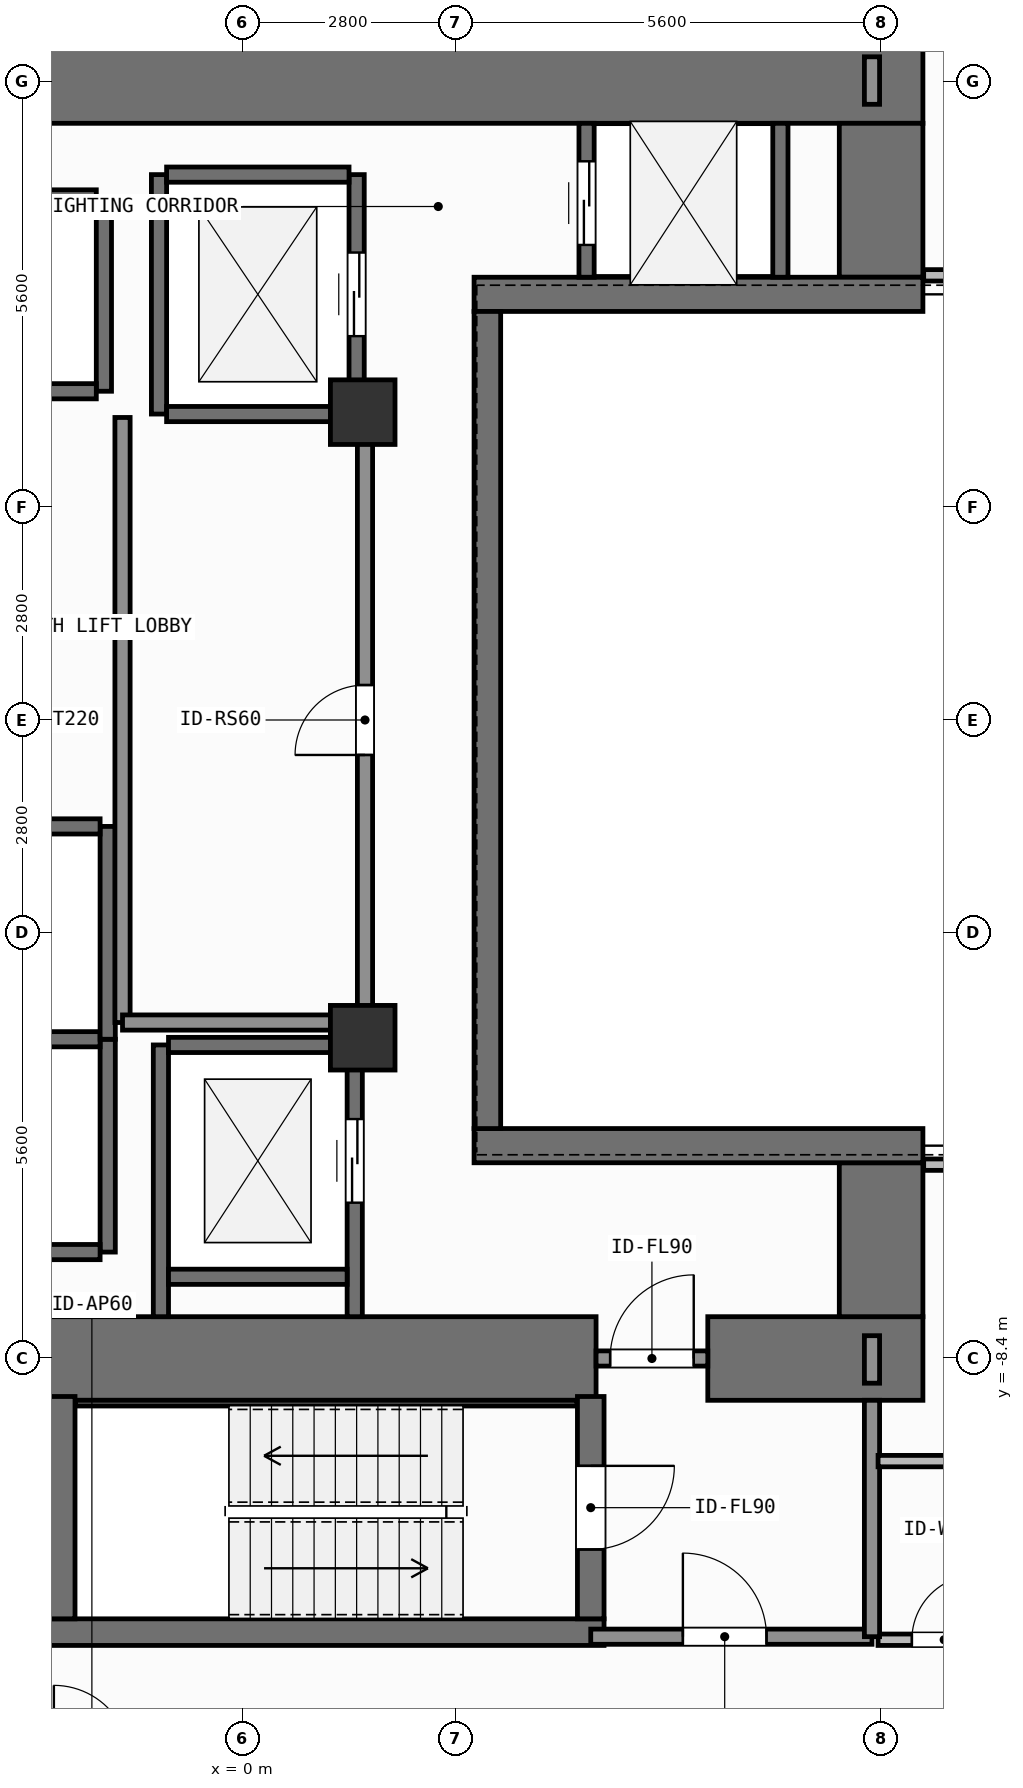
"""IFC4 building model, lengths in metres.
Left out: names, types, materials, properties, quantities, classifications, styles, units other than length and angle.
Written with IfcOpenShell. Run it as: python <this file> out.ifc"""

import sys

from ifc_helpers import new_model, si_unit, direction, frame, frame_2d, origin, origin_2d, place, context, subcontext, project, spatial, rectangle, extrude, element, fill, save


model = new_model("IFC4")
c1 = context("Model", 3, precision=1e-05, world=origin(), true_north=direction((0.0, 1.0)))
c2 = subcontext(c1, "Body", "Model", "MODEL_VIEW")
j1 = project(units=[si_unit("LENGTHUNIT", "METRE"), si_unit("PLANEANGLEUNIT", "RADIAN")], contexts=[c1])
p1 = place(None, origin())
s1 = spatial("IfcSite", under=j1, at=p1, CompositionType="ELEMENT")
p2 = place(p1, origin())
s2 = spatial("IfcBuilding", under=s1, at=p2, CompositionType="ELEMENT")
p3 = place(p2, frame((0.0, 0.0, 73.5)))
s3 = spatial("IfcBuildingStorey", under=s2, at=p3, CompositionType="ELEMENT", Elevation=73.5)
p4 = place(p3, frame((-2.62, -8.4, 0.0), z_axis=(0.0, 0.0, 1.0), x_axis=(1.0, 0.0, 0.0)))
e1 = element("IfcWall", 1, at=p4, inside=s3, PredefinedType="SHEAR", context=c2, shape_type="SweptSolid", body=[
    extrude(rectangle(XDim=7.27, YDim=1.1, at=frame_2d((3.635, 0.0))), origin(), (0.0, 0.0, 1.0), 3.9),
])
p5 = place(p3, frame((6.12, -8.4, 0.0), z_axis=(0.0, 0.0, 1.0), x_axis=(1.0, 0.0, 0.0)))
e2 = element("IfcWall", 2, at=p5, inside=s3, PredefinedType="SHEAR", context=c2, shape_type="SweptSolid", body=[
    extrude(rectangle(XDim=2.83, YDim=1.1, at=frame_2d((1.415, 0.0))), origin(), (0.0, 0.0, 1.0), 3.9),
])
p6 = place(p3, frame((-7.55, 8.4, 0.0), z_axis=(0.0, 0.0, 1.0), x_axis=(1.0, 0.0, 0.0)))
e3 = element("IfcWall", 3, at=p6, inside=s3, PredefinedType="SHEAR", context=c2, shape_type="SweptSolid", body=[
    extrude(rectangle(XDim=16.5, YDim=1.1, at=frame_2d((8.25, 0.0))), origin(), (0.0, 0.0, 1.0), 3.9),
])
for number, where, z_axis, x_axis in (
    (4, (8.4, -7.85, 0.0), (0.0, 0.0, 1.0), (0.0, 1.0, 0.0)),
    (5, (8.4, 5.825, 0.0), (0.0, 0.0, 1.0), (0.0, 1.0, 0.0)),
):
    element("IfcWall", number, at=place(p3, frame(where, z_axis=z_axis, x_axis=x_axis)), inside=s3, PredefinedType="SHEAR", context=c2, shape_type="SweptSolid", body=[
        extrude(rectangle(XDim=2.025, YDim=1.1, at=frame_2d((1.013, 0.0))), origin(), (0.0, 0.0, 1.0), 3.9),
    ])
for number, where, z_axis, x_axis in (
    (6, (3.045, -5.6, 0.0), (0.0, 0.0, 1.0), (1.0, 0.0, 0.0)),
    (7, (3.045, 5.6, 0.0), (0.0, 0.0, 1.0), (1.0, 0.0, 0.0)),
):
    element("IfcWall", number, at=place(p3, frame(where, z_axis=z_axis, x_axis=x_axis)), inside=s3, PredefinedType="SHEAR", context=c2, shape_type="SweptSolid", body=[
        extrude(rectangle(XDim=5.905, YDim=0.45, at=frame_2d((2.953, 0.0))), origin(), (0.0, 0.0, 1.0), 3.9),
    ])
p7 = place(p3, frame((3.22, -5.375, 0.0), z_axis=(0.0, 0.0, 1.0), x_axis=(0.0, 1.0, 0.0)))
e8 = element("IfcWall", 8, at=p7, inside=s3, PredefinedType="SHEAR", context=c2, shape_type="SweptSolid", body=[
    extrude(rectangle(XDim=10.75, YDim=0.35, at=frame_2d((5.375, 0.0))), origin(), (0.0, 0.0, 1.0), 3.9),
])
p8 = place(p3, frame((-2.555, -12.0, 0.0), z_axis=(0.0, 0.0, 1.0), x_axis=(1.0, 0.0, 0.0)))
e9 = element("IfcWall", 9, at=p8, inside=s3, PredefinedType="SHEAR", context=c2, shape_type="SweptSolid", body=[
    extrude(rectangle(XDim=7.31, YDim=0.35, at=frame_2d((3.655, 0.0))), origin(), (0.0, 0.0, 1.0), 3.9),
])
p9 = place(p3, frame((-2.2, -8.988, 0.0), z_axis=(0.0, 0.0, 1.0), x_axis=(1.0, 0.0, 0.0)))
e10 = element("IfcWall", 10, at=p9, inside=s3, PredefinedType="SHEAR", context=c2, shape_type="SweptSolid", body=[
    extrude(rectangle(XDim=6.6, YDim=0.075, at=frame_2d((3.3, 0.0))), origin(), (0.0, 0.0, 1.0), 3.9),
])
p10 = place(p3, frame((-2.38, -11.825, 0.0), z_axis=(0.0, 0.0, 1.0), x_axis=(0.0, 1.0, 0.0)))
e11 = element("IfcWall", 11, at=p10, inside=s3, PredefinedType="SHEAR", context=c2, shape_type="SweptSolid", body=[
    extrude(rectangle(XDim=2.925, YDim=0.35, at=frame_2d((1.462, 0.0))), origin(), (0.0, 0.0, 1.0), 3.9),
])
p11 = place(p3, frame((4.58, -8.9, 0.0), z_axis=(0.0, 0.0, 1.0), x_axis=(0.0, -1.0, 0.0)))
e12 = element("IfcWall", 12, at=p11, inside=s3, PredefinedType="SHEAR", context=c2, shape_type="SweptSolid", body=[
    extrude(rectangle(XDim=2.925, YDim=0.35, at=frame_2d((1.462, 0.0))), origin(), (0.0, 0.0, 1.0), 3.9),
])
p12 = place(p11, frame((0.913, 0.0, 0.0)))
e13 = element("IfcOpeningElement", 13, at=p12, cuts=e12, PredefinedType="OPENING", context=c2, shape_type="SweptSolid", body=[
    extrude(rectangle(XDim=1.1, YDim=2.15, at=frame_2d((0.55, 1.075))), frame((0.0, 0.185, 0.0), z_axis=(0.0, -1.0, 0.0), x_axis=(1.0, 0.0, 0.0)), (0.0, 0.0, 1.0), 0.37),
])
for number, where, z_axis, x_axis in (
    (14, (1.58, -4.18, 0.0), (0.0, 0.0, 1.0), (1.0, 0.0, 0.0)),
    (15, (1.58, 4.05, 0.0), (0.0, 0.0, 1.0), (1.0, 0.0, 0.0)),
):
    element("IfcColumn", number, at=place(p3, frame(where, z_axis=z_axis, x_axis=x_axis)), inside=s3, PredefinedType="COLUMN", context=c2, shape_type="SweptSolid", body=[
        extrude(rectangle(XDim=0.85, YDim=0.85, at=origin_2d()), origin(), (0.0, 0.0, 1.0), 3.9),
    ])
p13 = place(p3, frame((-1.825, 4.325, 0.0), z_axis=(0.0, 0.0, 1.0), x_axis=(0.0, 1.0, 0.0)))
e16 = element("IfcWall", 16, at=p13, inside=s3, PredefinedType="SHEAR", context=c2, shape_type="SweptSolid", body=[
    extrude(rectangle(XDim=2.55, YDim=0.2, at=frame_2d((1.275, 0.0))), origin(), (0.0, 0.0, 1.0), 3.6),
])
for number, where, z_axis, x_axis in (
    (17, (-4.275, 4.325, 0.0), (0.0, 0.0, 1.0), (1.0, 0.0, 0.0)),
    (18, (-4.275, 6.875, 0.0), (0.0, 0.0, 1.0), (1.0, 0.0, 0.0)),
):
    element("IfcWall", number, at=place(p3, frame(where, z_axis=z_axis, x_axis=x_axis)), inside=s3, PredefinedType="SHEAR", context=c2, shape_type="SweptSolid", body=[
        extrude(rectangle(XDim=2.35, YDim=0.2, at=frame_2d((1.175, 0.0))), origin(), (0.0, 0.0, 1.0), 3.6),
    ])
p14 = place(p3, frame((-1.775, -7.0, 0.0), z_axis=(0.0, 0.0, 1.0), x_axis=(0.0, 1.0, 0.0)))
e19 = element("IfcWall", 19, at=p14, inside=s3, PredefinedType="SHEAR", context=c2, shape_type="SweptSolid", body=[
    extrude(rectangle(XDim=2.8, YDim=0.2, at=frame_2d((1.4, 0.0))), origin(), (0.0, 0.0, 1.0), 3.6),
])
for number, where, z_axis, x_axis in (
    (20, (-4.325, -7.0, 0.0), (0.0, 0.0, 1.0), (1.0, 0.0, 0.0)),
    (21, (-4.325, -4.2, 0.0), (0.0, 0.0, 1.0), (1.0, 0.0, 0.0)),
):
    element("IfcWall", number, at=place(p3, frame(where, z_axis=z_axis, x_axis=x_axis)), inside=s3, PredefinedType="SHEAR", context=c2, shape_type="SweptSolid", body=[
        extrude(rectangle(XDim=2.45, YDim=0.2, at=frame_2d((1.225, 0.0))), origin(), (0.0, 0.0, 1.0), 3.6),
    ])
p15 = place(p3, frame((-1.775, -4.2, 0.0), z_axis=(0.0, 0.0, 1.0), x_axis=(0.0, 1.0, 0.0)))
e22 = element("IfcWall", 22, at=p15, inside=s3, PredefinedType="SHEAR", context=c2, shape_type="SweptSolid", body=[
    extrude(rectangle(XDim=2.8, YDim=0.2, at=frame_2d((1.4, 0.0))), origin(), (0.0, 0.0, 1.0), 3.6),
])
p16 = place(p3, frame((-4.325, -1.4, 0.0), z_axis=(0.0, 0.0, 1.0), x_axis=(1.0, 0.0, 0.0)))
e23 = element("IfcWall", 23, at=p16, inside=s3, PredefinedType="SHEAR", context=c2, shape_type="SweptSolid", body=[
    extrude(rectangle(XDim=2.45, YDim=0.2, at=frame_2d((1.225, 0.0))), origin(), (0.0, 0.0, 1.0), 3.6),
])
p17 = place(p3, frame((-1.1, 4.025, 0.0), z_axis=(0.0, 0.0, 1.0), x_axis=(0.0, 1.0, 0.0)))
e24 = element("IfcWall", 24, at=p17, inside=s3, PredefinedType="SHEAR", context=c2, shape_type="SweptSolid", body=[
    extrude(rectangle(XDim=3.15, YDim=0.2, at=frame_2d((1.575, 0.0))), origin(), (0.0, 0.0, 1.0), 3.6),
])
p18 = place(p3, frame((1.5, 4.025, 0.0), z_axis=(0.0, 0.0, 1.0), x_axis=(0.0, 1.0, 0.0)))
e25 = element("IfcWall", 25, at=p18, inside=s3, PredefinedType="SHEAR", context=c2, shape_type="SweptSolid", body=[
    extrude(rectangle(XDim=3.15, YDim=0.2, at=frame_2d((1.575, 0.0))), origin(), (0.0, 0.0, 1.0), 3.6),
])
p19 = place(p18, frame((1.025, 0.0, 0.0)))
e26 = element("IfcOpeningElement", 26, at=p19, cuts=e25, PredefinedType="OPENING", context=c2, shape_type="SweptSolid", body=[
    extrude(rectangle(XDim=1.1, YDim=2.2, at=frame_2d((0.55, 1.1))), frame((0.0, 0.11, 0.0), z_axis=(0.0, -1.0, 0.0), x_axis=(1.0, 0.0, 0.0)), (0.0, 0.0, 1.0), 0.22),
])
for number, where, z_axis, x_axis in (
    (27, (-1.0, 4.025, 0.0), (0.0, 0.0, 1.0), (1.0, 0.0, 0.0)),
    (28, (-1.0, 7.175, 0.0), (0.0, 0.0, 1.0), (1.0, 0.0, 0.0)),
):
    element("IfcWall", number, at=place(p3, frame(where, z_axis=z_axis, x_axis=x_axis)), inside=s3, PredefinedType="SHEAR", context=c2, shape_type="SweptSolid", body=[
        extrude(rectangle(XDim=2.4, YDim=0.2, at=frame_2d((1.2, 0.0))), origin(), (0.0, 0.0, 1.0), 3.6),
    ])
p20 = place(p3, frame((-1.075, -7.85, 0.0), z_axis=(0.0, 0.0, 1.0), x_axis=(0.0, 1.0, 0.0)))
e29 = element("IfcWall", 29, at=p20, inside=s3, PredefinedType="SHEAR", context=c2, shape_type="SweptSolid", body=[
    extrude(rectangle(XDim=3.575, YDim=0.2, at=frame_2d((1.788, 0.0))), origin(), (0.0, 0.0, 1.0), 3.6),
])
p21 = place(p3, frame((1.475, -7.85, 0.0), z_axis=(0.0, 0.0, 1.0), x_axis=(0.0, 1.0, 0.0)))
e30 = element("IfcWall", 30, at=p21, inside=s3, PredefinedType="SHEAR", context=c2, shape_type="SweptSolid", body=[
    extrude(rectangle(XDim=3.575, YDim=0.2, at=frame_2d((1.788, 0.0))), origin(), (0.0, 0.0, 1.0), 3.6),
])
p22 = place(p21, frame((1.5, 0.0, 0.0)))
e31 = element("IfcOpeningElement", 31, at=p22, cuts=e30, PredefinedType="OPENING", context=c2, shape_type="SweptSolid", body=[
    extrude(rectangle(XDim=1.1, YDim=2.2, at=frame_2d((0.55, 1.1))), frame((0.0, 0.11, 0.0), z_axis=(0.0, -1.0, 0.0), x_axis=(1.0, 0.0, 0.0)), (0.0, 0.0, 1.0), 0.22),
])
for number, where, z_axis, x_axis in (
    (32, (-0.975, -7.325, 0.0), (0.0, 0.0, 1.0), (1.0, 0.0, 0.0)),
    (33, (-0.975, -4.275, 0.0), (0.0, 0.0, 1.0), (1.0, 0.0, 0.0)),
):
    element("IfcWall", number, at=place(p3, frame(where, z_axis=z_axis, x_axis=x_axis)), inside=s3, PredefinedType="SHEAR", context=c2, shape_type="SweptSolid", body=[
        extrude(rectangle(XDim=2.35, YDim=0.2, at=frame_2d((1.175, 0.0))), origin(), (0.0, 0.0, 1.0), 3.6),
    ])
p23 = place(p3, frame((4.525, 5.825, 0.0), z_axis=(0.0, 0.0, 1.0), x_axis=(0.0, 1.0, 0.0)))
e34 = element("IfcWall", 34, at=p23, inside=s3, PredefinedType="SHEAR", context=c2, shape_type="SweptSolid", body=[
    extrude(rectangle(XDim=2.025, YDim=0.2, at=frame_2d((1.013, 0.0))), origin(), (0.0, 0.0, 1.0), 3.6),
])
p24 = place(p23, frame((0.425, 0.0, 0.0)))
e35 = element("IfcOpeningElement", 35, at=p24, cuts=e34, PredefinedType="OPENING", context=c2, shape_type="SweptSolid", body=[
    extrude(rectangle(XDim=1.1, YDim=2.2, at=frame_2d((0.55, 1.1))), frame((0.0, 0.11, 0.0), z_axis=(0.0, -1.0, 0.0), x_axis=(1.0, 0.0, 0.0)), (0.0, 0.0, 1.0), 0.22),
])
p25 = place(p3, frame((7.075, 5.825, 0.0), z_axis=(0.0, 0.0, 1.0), x_axis=(0.0, 1.0, 0.0)))
e36 = element("IfcWall", 36, at=p25, inside=s3, PredefinedType="SHEAR", context=c2, shape_type="SweptSolid", body=[
    extrude(rectangle(XDim=2.025, YDim=0.2, at=frame_2d((1.013, 0.0))), origin(), (0.0, 0.0, 1.0), 3.6),
])
p26 = place(p3, frame((4.58, -12.06, 0.0), z_axis=(0.0, 0.0, 1.0), x_axis=(1.0, 0.0, 0.0)))
e37 = element("IfcWall", 37, at=p26, inside=s3, PredefinedType="SOLIDWALL", context=c2, shape_type="SweptSolid", body=[
    extrude(rectangle(XDim=3.7, YDim=0.2, at=frame_2d((1.85, 0.0))), origin(), (0.0, 0.0, 1.0), 3.6),
])
p27 = place(p26, frame((1.212, 0.0, 0.0)))
e38 = element("IfcOpeningElement", 38, at=p27, cuts=e37, PredefinedType="OPENING", context=c2, shape_type="SweptSolid", body=[
    extrude(rectangle(XDim=1.1, YDim=2.15, at=frame_2d((0.55, 1.075))), frame((0.0, 0.11, 0.0), z_axis=(0.0, -1.0, 0.0), x_axis=(1.0, 0.0, 0.0)), (0.0, 0.0, 1.0), 0.22),
])
p28 = place(p3, frame((4.65, -8.4, 0.0), z_axis=(0.0, 0.0, 1.0), x_axis=(1.0, 0.0, 0.0)))
e39 = element("IfcWall", 39, at=p28, inside=s3, PredefinedType="SOLIDWALL", context=c2, shape_type="SweptSolid", body=[
    extrude(rectangle(XDim=1.47, YDim=0.2, at=frame_2d((0.735, 0.0))), origin(), (0.0, 0.0, 1.0), 2.64),
])
p29 = place(p28, frame((0.185, 0.0, 0.0)))
e40 = element("IfcOpeningElement", 40, at=p29, cuts=e39, PredefinedType="OPENING", context=c2, shape_type="SweptSolid", body=[
    extrude(rectangle(XDim=1.1, YDim=2.15, at=frame_2d((0.55, 1.075))), frame((0.0, 0.11, 0.0), z_axis=(0.0, -1.0, 0.0), x_axis=(1.0, 0.0, 0.0)), (0.0, 0.0, 1.0), 0.22),
])
p30 = place(p3, frame((1.61, -3.98, 0.0), z_axis=(0.0, 0.0, 1.0), x_axis=(0.0, 1.0, 0.0)))
e41 = element("IfcWall", 41, at=p30, inside=s3, PredefinedType="SOLIDWALL", context=c2, shape_type="SweptSolid", body=[
    extrude(rectangle(XDim=7.96, YDim=0.2, at=frame_2d((3.98, 0.0))), origin(), (0.0, 0.0, 1.0), 3.6),
])
p31 = place(p30, frame((3.52, 0.0, 0.0)))
e42 = element("IfcOpeningElement", 42, at=p31, cuts=e41, PredefinedType="OPENING", context=c2, shape_type="SweptSolid", body=[
    extrude(rectangle(XDim=0.92, YDim=2.1, at=frame_2d((0.46, 1.05))), frame((0.0, 0.11, 0.0), z_axis=(0.0, -1.0, 0.0), x_axis=(1.0, 0.0, 0.0)), (0.0, 0.0, 1.0), 0.22),
])
p32 = place(p3, frame((8.36, -12.1, 0.0), z_axis=(0.0, 0.0, 1.0), x_axis=(1.0, 0.0, 0.0)))
e43 = element("IfcWall", 43, at=p32, inside=s3, PredefinedType="PARTITIONING", context=c2, shape_type="SweptSolid", body=[
    extrude(rectangle(XDim=1.74, YDim=0.15, at=frame_2d((0.87, 0.0))), origin(), (0.0, 0.0, 1.0), 3.6),
])
p33 = place(p32, frame((0.445, 0.0, 0.0)))
e44 = element("IfcOpeningElement", 44, at=p33, cuts=e43, PredefinedType="OPENING", context=c2, shape_type="SweptSolid", body=[
    extrude(rectangle(XDim=0.85, YDim=2.1, at=frame_2d((0.425, 1.05))), frame((0.0, 0.085, 0.0), z_axis=(0.0, -1.0, 0.0), x_axis=(1.0, 0.0, 0.0)), (0.0, 0.0, 1.0), 0.17),
])
p34 = place(p3, frame((8.28, -12.06, 0.0), z_axis=(0.0, 0.0, 1.0), x_axis=(0.0, 1.0, 0.0)))
e45 = element("IfcWall", 45, at=p34, inside=s3, PredefinedType="SOLIDWALL", context=c2, shape_type="SweptSolid", body=[
    extrude(rectangle(XDim=3.11, YDim=0.2, at=frame_2d((1.555, 0.0))), origin(), (0.0, 0.0, 1.0), 3.6),
])
p35 = place(p3, frame((-1.58, -3.98, 0.0), z_axis=(0.0, 0.0, 1.0), x_axis=(0.0, 1.0, 0.0)))
e46 = element("IfcWall", 46, at=p35, inside=s3, PredefinedType="SOLIDWALL", context=c2, shape_type="SweptSolid", body=[
    extrude(rectangle(XDim=7.96, YDim=0.2, at=frame_2d((3.98, 0.0))), origin(), (0.0, 0.0, 1.0), 3.6),
])
p36 = place(p3, frame((-1.58, -3.98, 0.0), z_axis=(0.0, 0.0, 1.0), x_axis=(1.0, 0.0, 0.0)))
e47 = element("IfcWall", 47, at=p36, inside=s3, PredefinedType="SOLIDWALL", context=c2, shape_type="SweptSolid", body=[
    extrude(rectangle(XDim=3.19, YDim=0.2, at=frame_2d((1.595, 0.0))), origin(), (0.0, 0.0, 1.0), 3.6),
])
p37 = place(p3, frame((8.28, -8.725, 0.0), z_axis=(0.0, 0.0, 1.0), x_axis=(0.0, 1.0, 0.0)))
e48 = element("IfcWall", 48, at=p37, inside=s3, PredefinedType="SOLIDWALL", context=c2, shape_type="SweptSolid", body=[
    extrude(rectangle(XDim=0.625, YDim=0.2, at=frame_2d((0.312, 0.0))), origin(), (0.0, 0.0, 1.0), 3.6),
])
p38 = place(p3, frame((8.36, -9.75, 0.0), z_axis=(0.0, 0.0, 1.0), x_axis=(1.0, 0.0, 0.0)))
e49 = element("IfcWall", 49, at=p38, inside=s3, PredefinedType="PARTITIONING", context=c2, shape_type="SweptSolid", body=[
    extrude(rectangle(XDim=1.74, YDim=0.15, at=frame_2d((0.87, 0.0))), origin(), (0.0, 0.0, 1.0), 3.6),
])
p39 = place(p3, frame((8.96, -5.85, 0.0), z_axis=(0.0, 0.0, 1.0), x_axis=(1.0, 0.0, 0.0)))
e50 = element("IfcWall", 50, at=p39, inside=s3, PredefinedType="PARTITIONING", context=c2, shape_type="SweptSolid", body=[
    extrude(rectangle(XDim=6.62, YDim=0.15, at=frame_2d((3.31, 0.0))), origin(), (0.0, 0.0, 1.0), 3.6),
])
p40 = place(p3, frame((8.28, 8.1, 0.0), z_axis=(0.0, 0.0, 1.0), x_axis=(0.0, 1.0, 0.0)))
e51 = element("IfcWall", 51, at=p40, inside=s3, PredefinedType="SOLIDWALL", context=c2, shape_type="SweptSolid", body=[
    extrude(rectangle(XDim=0.625, YDim=0.2, at=frame_2d((0.312, 0.0))), origin(), (0.0, 0.0, 1.0), 3.6),
])
p41 = place(p3, frame((8.96, 5.85, 0.0), z_axis=(0.0, 0.0, 1.0), x_axis=(1.0, 0.0, 0.0)))
e52 = element("IfcWall", 52, at=p41, inside=s3, PredefinedType="PARTITIONING", context=c2, shape_type="SweptSolid", body=[
    extrude(rectangle(XDim=6.62, YDim=0.15, at=frame_2d((3.31, 0.0))), origin(), (0.0, 0.0, 1.0), 3.6),
])
p42 = place(p19, origin())
e53 = element("IfcDoor", 53, at=p42, inside=s3, OperationType="SLIDING_TO_LEFT", PredefinedType="DOOR", context=c2, shape_type="SweptSolid", body=[
    extrude(rectangle(XDim=1.1, YDim=2.2, at=frame_2d((0.55, 1.1))), frame((0.0, 0.025, 0.0), z_axis=(0.0, -1.0, 0.0), x_axis=(1.0, 0.0, 0.0)), (0.0, 0.0, 1.0), 0.05),
])
fill(e26, e53)
p43 = place(p22, origin())
e54 = element("IfcDoor", 54, at=p43, inside=s3, OperationType="SLIDING_TO_LEFT", PredefinedType="DOOR", context=c2, shape_type="SweptSolid", body=[
    extrude(rectangle(XDim=1.1, YDim=2.2, at=frame_2d((0.55, 1.1))), frame((0.0, 0.025, 0.0), z_axis=(0.0, -1.0, 0.0), x_axis=(1.0, 0.0, 0.0)), (0.0, 0.0, 1.0), 0.05),
])
fill(e31, e54)
p44 = place(p24, origin())
e55 = element("IfcDoor", 55, at=p44, inside=s3, OperationType="SLIDING_TO_LEFT", PredefinedType="DOOR", context=c2, shape_type="SweptSolid", body=[
    extrude(rectangle(XDim=1.1, YDim=2.2, at=frame_2d((0.55, 1.1))), frame((0.0, 0.025, 0.0), z_axis=(0.0, -1.0, 0.0), x_axis=(1.0, 0.0, 0.0)), (0.0, 0.0, 1.0), 0.05),
])
fill(e35, e55)
p45 = place(p12, origin())
e56 = element("IfcDoor", 56, at=p45, inside=s3, OperationType="SINGLE_SWING_LEFT", PredefinedType="DOOR", context=c2, shape_type="SweptSolid", body=[
    extrude(rectangle(XDim=1.1, YDim=2.15, at=frame_2d((0.55, 1.075))), frame((0.0, 0.025, 0.0), z_axis=(0.0, -1.0, 0.0), x_axis=(1.0, 0.0, 0.0)), (0.0, 0.0, 1.0), 0.05),
])
fill(e13, e56)
p46 = place(p27, origin())
e57 = element("IfcDoor", 57, at=p46, inside=s3, OperationType="SINGLE_SWING_LEFT", PredefinedType="DOOR", context=c2, shape_type="SweptSolid", body=[
    extrude(rectangle(XDim=1.1, YDim=2.15, at=frame_2d((0.55, 1.075))), frame((0.0, 0.025, 0.0), z_axis=(0.0, -1.0, 0.0), x_axis=(1.0, 0.0, 0.0)), (0.0, 0.0, 1.0), 0.05),
])
fill(e38, e57)
p47 = place(p29, origin())
e58 = element("IfcDoor", 58, at=p47, inside=s3, OperationType="SINGLE_SWING_RIGHT", PredefinedType="DOOR", context=c2, shape_type="SweptSolid", body=[
    extrude(rectangle(XDim=1.1, YDim=2.15, at=frame_2d((0.55, 1.075))), frame((0.0, 0.025, 0.0), z_axis=(0.0, -1.0, 0.0), x_axis=(1.0, 0.0, 0.0)), (0.0, 0.0, 1.0), 0.05),
])
fill(e40, e58)
p48 = place(p31, origin())
e59 = element("IfcDoor", 59, at=p48, inside=s3, OperationType="SINGLE_SWING_LEFT", PredefinedType="DOOR", context=c2, shape_type="SweptSolid", body=[
    extrude(rectangle(XDim=0.92, YDim=2.1, at=frame_2d((0.46, 1.05))), frame((0.0, 0.025, 0.0), z_axis=(0.0, -1.0, 0.0), x_axis=(1.0, 0.0, 0.0)), (0.0, 0.0, 1.0), 0.05),
])
fill(e42, e59)
p49 = place(p33, origin())
e60 = element("IfcDoor", 60, at=p49, inside=s3, OperationType="SINGLE_SWING_RIGHT", PredefinedType="DOOR", context=c2, shape_type="SweptSolid", body=[
    extrude(rectangle(XDim=0.85, YDim=2.1, at=frame_2d((0.425, 1.05))), frame((0.0, 0.025, 0.0), z_axis=(0.0, -1.0, 0.0), x_axis=(1.0, 0.0, 0.0)), (0.0, 0.0, 1.0), 0.05),
])
fill(e44, e60)
save(model, sys.argv[1])
